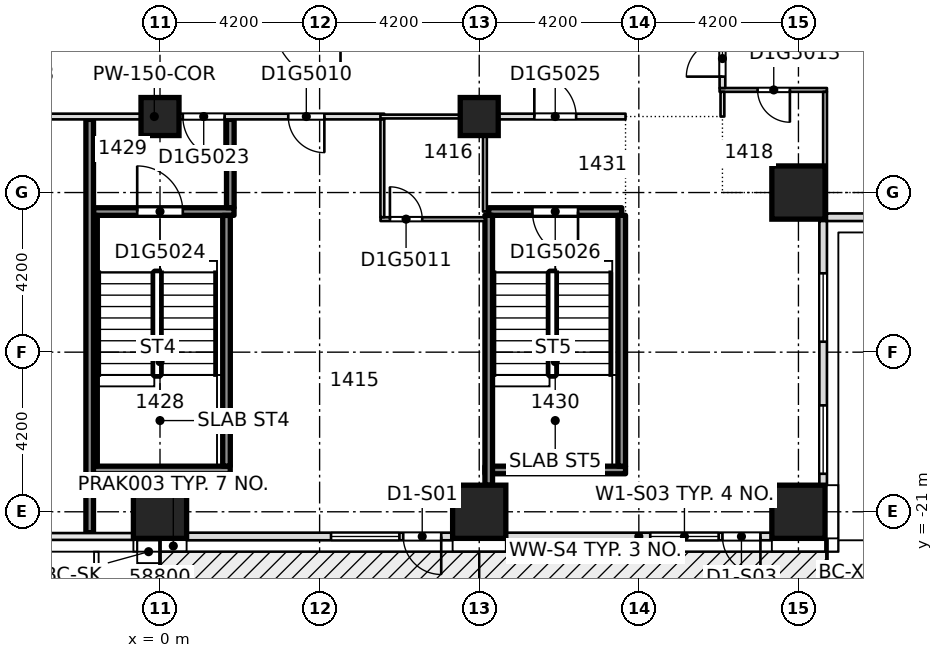
"""IFC4 building model, lengths in metres.
Left out: names, types, materials, properties, quantities, classifications, styles, units other than length and angle.
Written with IfcOpenShell. Run it as: python <this file> out.ifc"""

import sys

from ifc_helpers import new_model, si_unit, direction, frame, frame_2d, origin, origin_2d, place, context, subcontext, project, spatial, rectangle, extrude, element, fill, save


model = new_model("IFC4")
c1 = context("Model", 3, precision=1e-05, world=origin(), true_north=direction((0.0, 1.0)))
c2 = subcontext(c1, "Body", "Model", "MODEL_VIEW")
j1 = project(units=[si_unit("LENGTHUNIT", "METRE"), si_unit("PLANEANGLEUNIT", "RADIAN")], contexts=[c1])
p1 = place(None, origin())
s1 = spatial("IfcSite", under=j1, at=p1, CompositionType="ELEMENT")
p2 = place(p1, origin())
s2 = spatial("IfcBuilding", under=s1, at=p2, CompositionType="ELEMENT")
p3 = place(p2, frame((0.0, 0.0, 62.1)))
s3 = spatial("IfcBuildingStorey", under=s2, at=p3, CompositionType="ELEMENT", Elevation=62.1)
for number, where, z_axis, x_axis in (
    (1, (0.0, -21.0, -0.32), (0.0, 0.0, 1.0), (1.0, 0.0, 0.0)),
    (2, (8.4, -21.0, -0.32), (0.0, 0.0, 1.0), (1.0, 0.0, 0.0)),
    (3, (16.8, -21.0, -0.32), (0.0, 0.0, 1.0), (1.0, 0.0, 0.0)),
    (4, (16.8, -12.6, -0.32), (0.0, 0.0, 1.0), (1.0, 0.0, 0.0)),
):
    element("IfcColumn", number, at=place(p3, frame(where, z_axis=z_axis, x_axis=x_axis)), inside=s3, PredefinedType="COLUMN", context=c2, shape_type="SweptSolid", body=[
        extrude(rectangle(XDim=1.4, YDim=1.4, at=origin_2d()), origin(), (0.0, 0.0, 1.0), 3.45),
    ])
for number, where, z_axis, x_axis in (
    (5, (0.0, -10.6, -0.32), (0.0, 0.0, 1.0), (1.0, 0.0, 0.0)),
    (6, (8.4, -10.6, -0.32), (0.0, 0.0, 1.0), (1.0, 0.0, 0.0)),
):
    element("IfcColumn", number, at=place(p3, frame(where, z_axis=z_axis, x_axis=x_axis)), inside=s3, PredefinedType="COLUMN", context=c2, shape_type="SweptSolid", body=[
        extrude(rectangle(XDim=1.0, YDim=1.0, at=origin_2d()), origin(), (0.0, 0.0, 1.0), 3.45),
    ])
p4 = place(p3, frame((-1.848, -19.9, 0.0), z_axis=(0.0, 0.0, 1.0), x_axis=(1.0, 0.0, 0.0)))
e7 = element("IfcWall", 7, at=p4, inside=s3, PredefinedType="SOLIDWALL", context=c2, shape_type="SweptSolid", body=[
    extrude(rectangle(XDim=3.696, YDim=0.2, at=frame_2d((1.848, 0.0))), origin(), (0.0, 0.0, 1.0), 3.13),
])
p5 = place(p3, frame((5.802, -13.3, 0.0), z_axis=(0.0, 0.0, 1.0), x_axis=(1.0, 0.0, 0.0)))
e8 = element("IfcWall", 8, at=p5, inside=s3, PredefinedType="PARTITIONING", context=c2, shape_type="SweptSolid", body=[
    extrude(rectangle(XDim=2.748, YDim=0.1, at=frame_2d((1.374, 0.0))), origin(), (0.0, 0.0, 1.0), 3.13),
])
p6 = place(p5, frame((0.248, 0.0, 0.0)))
e9 = element("IfcOpeningElement", 9, at=p6, cuts=e8, PredefinedType="OPENING", context=c2, shape_type="SweptSolid", body=[
    extrude(rectangle(XDim=0.85, YDim=2.1, at=frame_2d((0.425, 1.05))), frame((0.0, 0.06, 0.0), z_axis=(0.0, -1.0, 0.0), x_axis=(1.0, 0.0, 0.0)), (0.0, 0.0, 1.0), 0.12),
])
p7 = place(p3, frame((-1.748, -13.1, 0.0), z_axis=(0.0, 0.0, 1.0), x_axis=(1.0, 0.0, 0.0)))
e10 = element("IfcWall", 10, at=p7, inside=s3, PredefinedType="SOLIDWALL", context=c2, shape_type="SweptSolid", body=[
    extrude(rectangle(XDim=3.696, YDim=0.2, at=frame_2d((1.848, 0.0))), origin(), (0.0, 0.0, 1.0), 3.13),
])
p8 = place(p7, frame((1.148, 0.0, 0.0)))
e11 = element("IfcOpeningElement", 11, at=p8, cuts=e10, PredefinedType="OPENING", context=c2, shape_type="SweptSolid", body=[
    extrude(rectangle(XDim=1.2, YDim=2.1, at=frame_2d((0.6, 1.05))), frame((0.0, 0.11, 0.0), z_axis=(0.0, -1.0, 0.0), x_axis=(1.0, 0.0, 0.0)), (0.0, 0.0, 1.0), 0.22),
])
p9 = place(p3, frame((8.65, -13.1, 0.0), z_axis=(0.0, 0.0, 1.0), x_axis=(1.0, 0.0, 0.0)))
e12 = element("IfcWall", 12, at=p9, inside=s3, PredefinedType="SOLIDWALL", context=c2, shape_type="SweptSolid", body=[
    extrude(rectangle(XDim=3.5, YDim=0.2, at=frame_2d((1.75, 0.0))), origin(), (0.0, 0.0, 1.0), 3.13),
])
p10 = place(p9, frame((1.15, 0.0, 0.0)))
e13 = element("IfcOpeningElement", 13, at=p10, cuts=e12, PredefinedType="OPENING", context=c2, shape_type="SweptSolid", body=[
    extrude(rectangle(XDim=1.2, YDim=2.1, at=frame_2d((0.6, 1.05))), frame((0.0, 0.11, 0.0), z_axis=(0.0, -1.0, 0.0), x_axis=(1.0, 0.0, 0.0)), (0.0, 0.0, 1.0), 0.22),
])
p11 = place(p3, frame((-6.2, -10.6, 0.0), z_axis=(0.0, 0.0, 1.0), x_axis=(1.0, 0.0, 0.0)))
e14 = element("IfcWall", 14, at=p11, inside=s3, PredefinedType="PARTITIONING", context=c2, shape_type="SweptSolid", body=[
    extrude(rectangle(XDim=12.1, YDim=0.15, at=frame_2d((6.05, 0.0))), origin(), (0.0, 0.0, 1.0), 3.13),
])
p12 = place(p11, frame((1.725, 0.0, 0.0)))
e15 = element("IfcOpeningElement", 15, at=p12, cuts=e14, PredefinedType="OPENING", context=c2, shape_type="SweptSolid", body=[
    extrude(rectangle(XDim=0.95, YDim=2.1, at=frame_2d((0.475, 1.05))), frame((0.0, 0.085, 0.0), z_axis=(0.0, -1.0, 0.0), x_axis=(1.0, 0.0, 0.0)), (0.0, 0.0, 1.0), 0.17),
])
p13 = place(p11, frame((9.575, 0.0, 0.0)))
e16 = element("IfcOpeningElement", 16, at=p13, cuts=e14, PredefinedType="OPENING", context=c2, shape_type="SweptSolid", body=[
    extrude(rectangle(XDim=0.95, YDim=2.1, at=frame_2d((0.475, 1.05))), frame((0.0, 0.085, 0.0), z_axis=(0.0, -1.0, 0.0), x_axis=(1.0, 0.0, 0.0)), (0.0, 0.0, 1.0), 0.17),
])
p14 = place(p11, frame((6.8, 0.0, 0.0)))
e17 = element("IfcOpeningElement", 17, at=p14, cuts=e14, PredefinedType="OPENING", context=c2, shape_type="SweptSolid", body=[
    extrude(rectangle(XDim=1.1, YDim=2.1, at=frame_2d((0.55, 1.05))), frame((0.0, 0.085, 0.0), z_axis=(0.0, -1.0, 0.0), x_axis=(1.0, 0.0, 0.0)), (0.0, 0.0, 1.0), 0.17),
])
p15 = place(p3, frame((5.8, -10.6, 0.0), z_axis=(0.0, 0.0, 1.0), x_axis=(1.0, 0.0, 0.0)))
e18 = element("IfcWall", 18, at=p15, inside=s3, PredefinedType="PARTITIONING", context=c2, shape_type="SweptSolid", body=[
    extrude(rectangle(XDim=2.8, YDim=0.1, at=frame_2d((1.4, 0.0))), origin(), (0.0, 0.0, 1.0), 3.13),
])
p16 = place(p3, frame((8.5, -10.6, 0.0), z_axis=(0.0, 0.0, 1.0), x_axis=(1.0, 0.0, 0.0)))
e19 = element("IfcWall", 19, at=p16, inside=s3, PredefinedType="PARTITIONING", context=c2, shape_type="SweptSolid", body=[
    extrude(rectangle(XDim=3.75, YDim=0.15, at=frame_2d((1.875, 0.0))), origin(), (0.0, 0.0, 1.0), 3.13),
])
p17 = place(p16, frame((1.35, 0.0, 0.0)))
e20 = element("IfcOpeningElement", 20, at=p17, cuts=e19, PredefinedType="OPENING", context=c2, shape_type="SweptSolid", body=[
    extrude(rectangle(XDim=1.1, YDim=2.1, at=frame_2d((0.55, 1.05))), frame((0.0, 0.085, 0.0), z_axis=(0.0, -1.0, 0.0), x_axis=(1.0, 0.0, 0.0)), (0.0, 0.0, 1.0), 0.17),
])
p18 = place(p3, frame((14.725, -9.9, 0.0), z_axis=(0.0, 0.0, 1.0), x_axis=(1.0, 0.0, 0.0)))
e21 = element("IfcWall", 21, at=p18, inside=s3, PredefinedType="PARTITIONING", context=c2, shape_type="SweptSolid", body=[
    extrude(rectangle(XDim=2.825, YDim=0.1, at=frame_2d((1.413, 0.0))), origin(), (0.0, 0.0, 1.0), 3.13),
])
p19 = place(p18, frame((1.0, 0.0, 0.0)))
e22 = element("IfcOpeningElement", 22, at=p19, cuts=e21, PredefinedType="OPENING", context=c2, shape_type="SweptSolid", body=[
    extrude(rectangle(XDim=0.85, YDim=2.1, at=frame_2d((0.425, 1.05))), frame((0.0, 0.06, 0.0), z_axis=(0.0, -1.0, 0.0), x_axis=(1.0, 0.0, 0.0)), (0.0, 0.0, 1.0), 0.12),
])
for number, where, z_axis, x_axis in (
    (23, (-1.75, -19.798, 0.0), (0.0, 0.0, 1.0), (0.0, 1.0, 0.0)),
    (24, (1.75, -19.798, 0.0), (0.0, 0.0, 1.0), (0.0, 1.0, 0.0)),
):
    element("IfcWall", number, at=place(p3, frame(where, z_axis=z_axis, x_axis=x_axis)), inside=s3, PredefinedType="SOLIDWALL", context=c2, shape_type="SweptSolid", body=[
        extrude(rectangle(XDim=6.596, YDim=0.2, at=frame_2d((3.298, 0.0))), origin(), (0.0, 0.0, 1.0), 3.13),
    ])
p20 = place(p3, frame((1.85, -12.998, 0.0), z_axis=(0.0, 0.0, 1.0), x_axis=(0.0, 1.0, 0.0)))
e25 = element("IfcWall", 25, at=p20, inside=s3, PredefinedType="SOLIDWALL", context=c2, shape_type="SweptSolid", body=[
    extrude(rectangle(XDim=2.323, YDim=0.2, at=frame_2d((1.162, 0.0))), origin(), (0.0, 0.0, 1.0), 3.13),
])
p21 = place(p3, frame((5.85, -13.248, 0.0), z_axis=(0.0, 0.0, 1.0), x_axis=(0.0, 1.0, 0.0)))
e26 = element("IfcWall", 26, at=p21, inside=s3, PredefinedType="PARTITIONING", context=c2, shape_type="SweptSolid", body=[
    extrude(rectangle(XDim=2.573, YDim=0.1, at=frame_2d((1.287, 0.0))), origin(), (0.0, 0.0, 1.0), 3.13),
])
p22 = place(p3, frame((8.55, -13.1, 0.0), z_axis=(0.0, 0.0, 1.0), x_axis=(0.0, 1.0, 0.0)))
e27 = element("IfcWall", 27, at=p22, inside=s3, PredefinedType="PARTITIONING", context=c2, shape_type="SweptSolid", body=[
    extrude(rectangle(XDim=2.425, YDim=0.1, at=frame_2d((1.212, 0.0))), origin(), (0.0, 0.0, 1.0), 3.13),
])
p23 = place(p3, frame((14.8, -10.6, 0.0), z_axis=(0.0, 0.0, 1.0), x_axis=(0.0, 1.0, 0.0)))
e28 = element("IfcWall", 28, at=p23, inside=s3, PredefinedType="PARTITIONING", context=c2, shape_type="SweptSolid", body=[
    extrude(rectangle(XDim=0.65, YDim=0.1, at=frame_2d((0.325, 0.0))), origin(), (0.0, 0.0, 1.0), 3.13),
])
p24 = place(p3, frame((14.8, -9.85, 0.0), z_axis=(0.0, 0.0, 1.0), x_axis=(0.0, 1.0, 0.0)))
e29 = element("IfcWall", 29, at=p24, inside=s3, PredefinedType="PARTITIONING", context=c2, shape_type="SweptSolid", body=[
    extrude(rectangle(XDim=18.175, YDim=0.15, at=frame_2d((9.087, 0.0))), origin(), (0.0, 0.0, 1.0), 3.13),
])
p25 = place(p24, frame((0.3, 0.0, 0.0)))
e30 = element("IfcOpeningElement", 30, at=p25, cuts=e29, PredefinedType="OPENING", context=c2, shape_type="SweptSolid", body=[
    extrude(rectangle(XDim=0.95, YDim=2.1, at=frame_2d((0.475, 1.05))), frame((0.0, 0.085, 0.0), z_axis=(0.0, -1.0, 0.0), x_axis=(1.0, 0.0, 0.0)), (0.0, 0.0, 1.0), 0.17),
])
p26 = place(p24, frame((9.3, 0.0, 0.0)))
e31 = element("IfcOpeningElement", 31, at=p26, cuts=e29, PredefinedType="OPENING", context=c2, shape_type="SweptSolid", body=[
    extrude(rectangle(XDim=1.1, YDim=2.1, at=frame_2d((0.55, 1.05))), frame((0.0, 0.085, 0.0), z_axis=(0.0, -1.0, 0.0), x_axis=(1.0, 0.0, 0.0)), (0.0, 0.0, 1.0), 0.17),
])
p27 = place(p24, frame((4.05, 0.0, 0.0)))
e32 = element("IfcOpeningElement", 32, at=p27, cuts=e29, PredefinedType="OPENING", context=c2, shape_type="SweptSolid", body=[
    extrude(rectangle(XDim=1.0, YDim=2.1, at=frame_2d((0.5, 1.05))), frame((0.0, 0.085, 0.0), z_axis=(0.0, -1.0, 0.0), x_axis=(1.0, 0.0, 0.0)), (0.0, 0.0, 1.0), 0.17),
])
p28 = place(p3, frame((17.5, -13.35, 0.0), z_axis=(0.0, 0.0, 1.0), x_axis=(0.0, 1.0, 0.0)))
e33 = element("IfcWall", 33, at=p28, inside=s3, PredefinedType="PARTITIONING", context=c2, shape_type="SweptSolid", body=[
    extrude(rectangle(XDim=3.4, YDim=0.1, at=frame_2d((1.7, 0.0))), origin(), (0.0, 0.0, 1.0), 3.13),
])
p29 = place(p3, frame((0.7, -21.65, 0.0), z_axis=(0.0, 0.0, 1.0), x_axis=(1.0, 0.0, 0.0)))
e34 = element("IfcWall", 34, at=p29, inside=s3, PredefinedType="STANDARD", context=c2, shape_type="SweptSolid", body=[
    extrude(rectangle(XDim=7.0, YDim=0.2, at=frame_2d((3.5, 0.0))), origin(), (0.0, 0.0, 1.0), 3.13),
])
p30 = place(p29, frame((3.8, 0.0, 0.2)))
e35 = element("IfcOpeningElement", 35, at=p30, cuts=e34, PredefinedType="OPENING", context=c2, shape_type="SweptSolid", body=[
    extrude(rectangle(XDim=1.8, YDim=2.65, at=frame_2d((0.9, 1.325))), frame((0.0, 0.11, 0.0), z_axis=(0.0, -1.0, 0.0), x_axis=(1.0, 0.0, 0.0)), (0.0, 0.0, 1.0), 0.22),
])
p31 = place(p29, frame((5.7, 0.0, 0.0)))
e36 = element("IfcOpeningElement", 36, at=p31, cuts=e34, PredefinedType="OPENING", context=c2, shape_type="SweptSolid", body=[
    extrude(rectangle(XDim=1.0, YDim=2.4, at=frame_2d((0.5, 1.2))), frame((0.0, 0.11, 0.0), z_axis=(0.0, -1.0, 0.0), x_axis=(1.0, 0.0, 0.0)), (0.0, 0.0, 1.0), 0.22),
])
p32 = place(p3, frame((9.1, -21.65, 0.0), z_axis=(0.0, 0.0, 1.0), x_axis=(1.0, 0.0, 0.0)))
e37 = element("IfcWall", 37, at=p32, inside=s3, PredefinedType="STANDARD", context=c2, shape_type="SweptSolid", body=[
    extrude(rectangle(XDim=7.0, YDim=0.2, at=frame_2d((3.5, 0.0))), origin(), (0.0, 0.0, 1.0), 3.13),
])
p33 = place(p32, frame((3.8, 0.0, 0.2)))
e38 = element("IfcOpeningElement", 38, at=p33, cuts=e37, PredefinedType="OPENING", context=c2, shape_type="SweptSolid", body=[
    extrude(rectangle(XDim=1.8, YDim=2.65, at=frame_2d((0.9, 1.325))), frame((0.0, 0.11, 0.0), z_axis=(0.0, -1.0, 0.0), x_axis=(1.0, 0.0, 0.0)), (0.0, 0.0, 1.0), 0.22),
])
p34 = place(p32, frame((5.7, 0.0, 0.0)))
e39 = element("IfcOpeningElement", 39, at=p34, cuts=e37, PredefinedType="OPENING", context=c2, shape_type="SweptSolid", body=[
    extrude(rectangle(XDim=1.0, YDim=2.4, at=frame_2d((0.5, 1.2))), frame((0.0, 0.11, 0.0), z_axis=(0.0, -1.0, 0.0), x_axis=(1.0, 0.0, 0.0)), (0.0, 0.0, 1.0), 0.22),
])
p35 = place(p3, frame((17.45, -20.3, 0.0), z_axis=(0.0, 0.0, 1.0), x_axis=(0.0, 1.0, 0.0)))
e40 = element("IfcWall", 40, at=p35, inside=s3, PredefinedType="STANDARD", context=c2, shape_type="SweptSolid", body=[
    extrude(rectangle(XDim=6.95, YDim=0.2, at=frame_2d((3.475, 0.0))), origin(), (0.0, 0.0, 1.0), 3.13),
])
p36 = place(p35, frame((0.3, 0.0, 0.2)))
e41 = element("IfcOpeningElement", 41, at=p36, cuts=e40, PredefinedType="OPENING", context=c2, shape_type="SweptSolid", body=[
    extrude(rectangle(XDim=1.8, YDim=2.65, at=frame_2d((0.9, 1.325))), frame((0.0, 0.11, 0.0), z_axis=(0.0, -1.0, 0.0), x_axis=(1.0, 0.0, 0.0)), (0.0, 0.0, 1.0), 0.22),
])
p37 = place(p35, frame((3.775, 0.0, 0.2)))
e42 = element("IfcOpeningElement", 42, at=p37, cuts=e40, PredefinedType="OPENING", context=c2, shape_type="SweptSolid", body=[
    extrude(rectangle(XDim=1.8, YDim=2.65, at=frame_2d((0.9, 1.325))), frame((0.0, 0.11, 0.0), z_axis=(0.0, -1.0, 0.0), x_axis=(1.0, 0.0, 0.0)), (0.0, 0.0, 1.0), 0.22),
])
p38 = place(p3, frame((17.55, -13.25, 0.0), z_axis=(0.0, 0.0, 1.0), x_axis=(1.0, 0.0, 0.0)))
e43 = element("IfcWall", 43, at=p38, inside=s3, PredefinedType="STANDARD", context=c2, shape_type="SweptSolid", body=[
    extrude(rectangle(XDim=6.95, YDim=0.2, at=frame_2d((3.475, 0.0))), origin(), (0.0, 0.0, 1.0), 3.13),
])
p39 = place(p3, frame((8.55, -19.9, 0.0), z_axis=(0.0, 0.0, 1.0), x_axis=(1.0, 0.0, 0.0)))
e44 = element("IfcWall", 44, at=p39, inside=s3, PredefinedType="SOLIDWALL", context=c2, shape_type="SweptSolid", body=[
    extrude(rectangle(XDim=3.7, YDim=0.2, at=frame_2d((1.85, 0.0))), origin(), (0.0, 0.0, 1.0), 3.13),
])
p40 = place(p3, frame((8.65, -20.3, 0.0), z_axis=(0.0, 0.0, 1.0), x_axis=(0.0, 1.0, 0.0)))
e45 = element("IfcWall", 45, at=p40, inside=s3, PredefinedType="SOLIDWALL", context=c2, shape_type="SweptSolid", body=[
    extrude(rectangle(XDim=7.1, YDim=0.2, at=frame_2d((3.55, 0.0))), origin(), (0.0, 0.0, 1.0), 3.13),
])
p41 = place(p3, frame((12.15, -19.8, 0.0), z_axis=(0.0, 0.0, 1.0), x_axis=(0.0, 1.0, 0.0)))
e46 = element("IfcWall", 46, at=p41, inside=s3, PredefinedType="SOLIDWALL", context=c2, shape_type="SweptSolid", body=[
    extrude(rectangle(XDim=6.6, YDim=0.2, at=frame_2d((3.3, 0.0))), origin(), (0.0, 0.0, 1.0), 3.13),
])
p42 = place(p3, frame((-1.85, -21.55, 0.0), z_axis=(0.0, 0.0, 1.0), x_axis=(0.0, 1.0, 0.0)))
e47 = element("IfcWall", 47, at=p42, inside=s3, PredefinedType="SOLIDWALL", context=c2, shape_type="SweptSolid", body=[
    extrude(rectangle(XDim=10.875, YDim=0.2, at=frame_2d((5.438, 0.0))), origin(), (0.0, 0.0, 1.0), 3.13),
])
p43 = place(p13, origin())
e48 = element("IfcDoor", 48, at=p43, inside=s3, OperationType="SINGLE_SWING_RIGHT", PredefinedType="DOOR", context=c2, shape_type="SweptSolid", body=[
    extrude(rectangle(XDim=0.95, YDim=2.1, at=frame_2d((0.475, 1.05))), frame((0.0, 0.025, 0.0), z_axis=(0.0, -1.0, 0.0), x_axis=(1.0, 0.0, 0.0)), (0.0, 0.0, 1.0), 0.05),
])
fill(e16, e48)
p44 = place(p6, origin())
e49 = element("IfcDoor", 49, at=p44, inside=s3, OperationType="SINGLE_SWING_LEFT", PredefinedType="DOOR", context=c2, shape_type="SweptSolid", body=[
    extrude(rectangle(XDim=0.85, YDim=2.1, at=frame_2d((0.425, 1.05))), frame((0.0, 0.025, 0.0), z_axis=(0.0, -1.0, 0.0), x_axis=(1.0, 0.0, 0.0)), (0.0, 0.0, 1.0), 0.05),
])
fill(e9, e49)
p45 = place(p25, origin())
e50 = element("IfcDoor", 50, at=p45, inside=s3, OperationType="SINGLE_SWING_RIGHT", PredefinedType="DOOR", context=c2, shape_type="SweptSolid", body=[
    extrude(rectangle(XDim=0.95, YDim=2.1, at=frame_2d((0.475, 1.05))), frame((0.0, 0.025, 0.0), z_axis=(0.0, -1.0, 0.0), x_axis=(1.0, 0.0, 0.0)), (0.0, 0.0, 1.0), 0.05),
])
fill(e30, e50)
p46 = place(p19, origin())
e51 = element("IfcDoor", 51, at=p46, inside=s3, OperationType="SINGLE_SWING_RIGHT", PredefinedType="DOOR", context=c2, shape_type="SweptSolid", body=[
    extrude(rectangle(XDim=0.85, YDim=2.1, at=frame_2d((0.425, 1.05))), frame((0.0, 0.025, 0.0), z_axis=(0.0, -1.0, 0.0), x_axis=(1.0, 0.0, 0.0)), (0.0, 0.0, 1.0), 0.05),
])
fill(e22, e51)
p47 = place(p14, origin())
e52 = element("IfcDoor", 52, at=p47, inside=s3, OperationType="SINGLE_SWING_RIGHT", PredefinedType="DOOR", context=c2, shape_type="SweptSolid", body=[
    extrude(rectangle(XDim=1.1, YDim=2.1, at=frame_2d((0.55, 1.05))), frame((0.0, 0.025, 0.0), z_axis=(0.0, -1.0, 0.0), x_axis=(1.0, 0.0, 0.0)), (0.0, 0.0, 1.0), 0.05),
])
fill(e17, e52)
p48 = place(p8, origin())
e53 = element("IfcDoor", 53, at=p48, inside=s3, OperationType="SINGLE_SWING_RIGHT", PredefinedType="DOOR", context=c2, shape_type="SweptSolid", body=[
    extrude(rectangle(XDim=1.2, YDim=2.1, at=frame_2d((0.6, 1.05))), frame((0.0, 0.025, 0.0), z_axis=(0.0, -1.0, 0.0), x_axis=(1.0, 0.0, 0.0)), (0.0, 0.0, 1.0), 0.05),
])
fill(e11, e53)
p49 = place(p17, origin())
e54 = element("IfcDoor", 54, at=p49, inside=s3, OperationType="SINGLE_SWING_RIGHT", PredefinedType="DOOR", context=c2, shape_type="SweptSolid", body=[
    extrude(rectangle(XDim=1.1, YDim=2.1, at=frame_2d((0.55, 1.05))), frame((0.0, 0.025, 0.0), z_axis=(0.0, -1.0, 0.0), x_axis=(1.0, 0.0, 0.0)), (0.0, 0.0, 1.0), 0.05),
])
fill(e20, e54)
p50 = place(p10, origin())
e55 = element("IfcDoor", 55, at=p50, inside=s3, OperationType="SINGLE_SWING_RIGHT", PredefinedType="DOOR", context=c2, shape_type="SweptSolid", body=[
    extrude(rectangle(XDim=1.2, YDim=2.1, at=frame_2d((0.6, 1.05))), frame((0.0, 0.025, 0.0), z_axis=(0.0, -1.0, 0.0), x_axis=(1.0, 0.0, 0.0)), (0.0, 0.0, 1.0), 0.05),
])
fill(e13, e55)
p51 = place(p30, origin())
e56 = element("IfcWindow", 56, at=p51, inside=s3, PartitioningType="SINGLE_PANEL", PredefinedType="WINDOW", context=c2, shape_type="SweptSolid", body=[
    extrude(rectangle(XDim=1.8, YDim=2.65, at=frame_2d((0.9, 1.325))), frame((0.0, 0.03, 0.0), z_axis=(0.0, -1.0, 0.0), x_axis=(1.0, 0.0, 0.0)), (0.0, 0.0, 1.0), 0.06),
])
fill(e35, e56)
p52 = place(p31, origin())
e57 = element("IfcDoor", 57, at=p52, inside=s3, OperationType="SINGLE_SWING_LEFT", PredefinedType="DOOR", context=c2, shape_type="SweptSolid", body=[
    extrude(rectangle(XDim=1.0, YDim=2.4, at=frame_2d((0.5, 1.2))), frame((0.0, 0.025, 0.0), z_axis=(0.0, -1.0, 0.0), x_axis=(1.0, 0.0, 0.0)), (0.0, 0.0, 1.0), 0.05),
])
fill(e36, e57)
p53 = place(p33, origin())
e58 = element("IfcWindow", 58, at=p53, inside=s3, PartitioningType="SINGLE_PANEL", PredefinedType="WINDOW", context=c2, shape_type="SweptSolid", body=[
    extrude(rectangle(XDim=1.8, YDim=2.65, at=frame_2d((0.9, 1.325))), frame((0.0, 0.03, 0.0), z_axis=(0.0, -1.0, 0.0), x_axis=(1.0, 0.0, 0.0)), (0.0, 0.0, 1.0), 0.06),
])
fill(e38, e58)
p54 = place(p34, origin())
e59 = element("IfcDoor", 59, at=p54, inside=s3, OperationType="SINGLE_SWING_LEFT", PredefinedType="DOOR", context=c2, shape_type="SweptSolid", body=[
    extrude(rectangle(XDim=1.0, YDim=2.4, at=frame_2d((0.5, 1.2))), frame((0.0, 0.025, 0.0), z_axis=(0.0, -1.0, 0.0), x_axis=(1.0, 0.0, 0.0)), (0.0, 0.0, 1.0), 0.05),
])
fill(e39, e59)
p55 = place(p36, origin())
e60 = element("IfcWindow", 60, at=p55, inside=s3, PartitioningType="SINGLE_PANEL", PredefinedType="WINDOW", context=c2, shape_type="SweptSolid", body=[
    extrude(rectangle(XDim=1.8, YDim=2.65, at=frame_2d((0.9, 1.325))), frame((0.0, 0.03, 0.0), z_axis=(0.0, -1.0, 0.0), x_axis=(1.0, 0.0, 0.0)), (0.0, 0.0, 1.0), 0.06),
])
fill(e41, e60)
p56 = place(p37, origin())
e61 = element("IfcWindow", 61, at=p56, inside=s3, PartitioningType="SINGLE_PANEL", PredefinedType="WINDOW", context=c2, shape_type="SweptSolid", body=[
    extrude(rectangle(XDim=1.8, YDim=2.65, at=frame_2d((0.9, 1.325))), frame((0.0, 0.03, 0.0), z_axis=(0.0, -1.0, 0.0), x_axis=(1.0, 0.0, 0.0)), (0.0, 0.0, 1.0), 0.06),
])
fill(e42, e61)
save(model, sys.argv[1])
